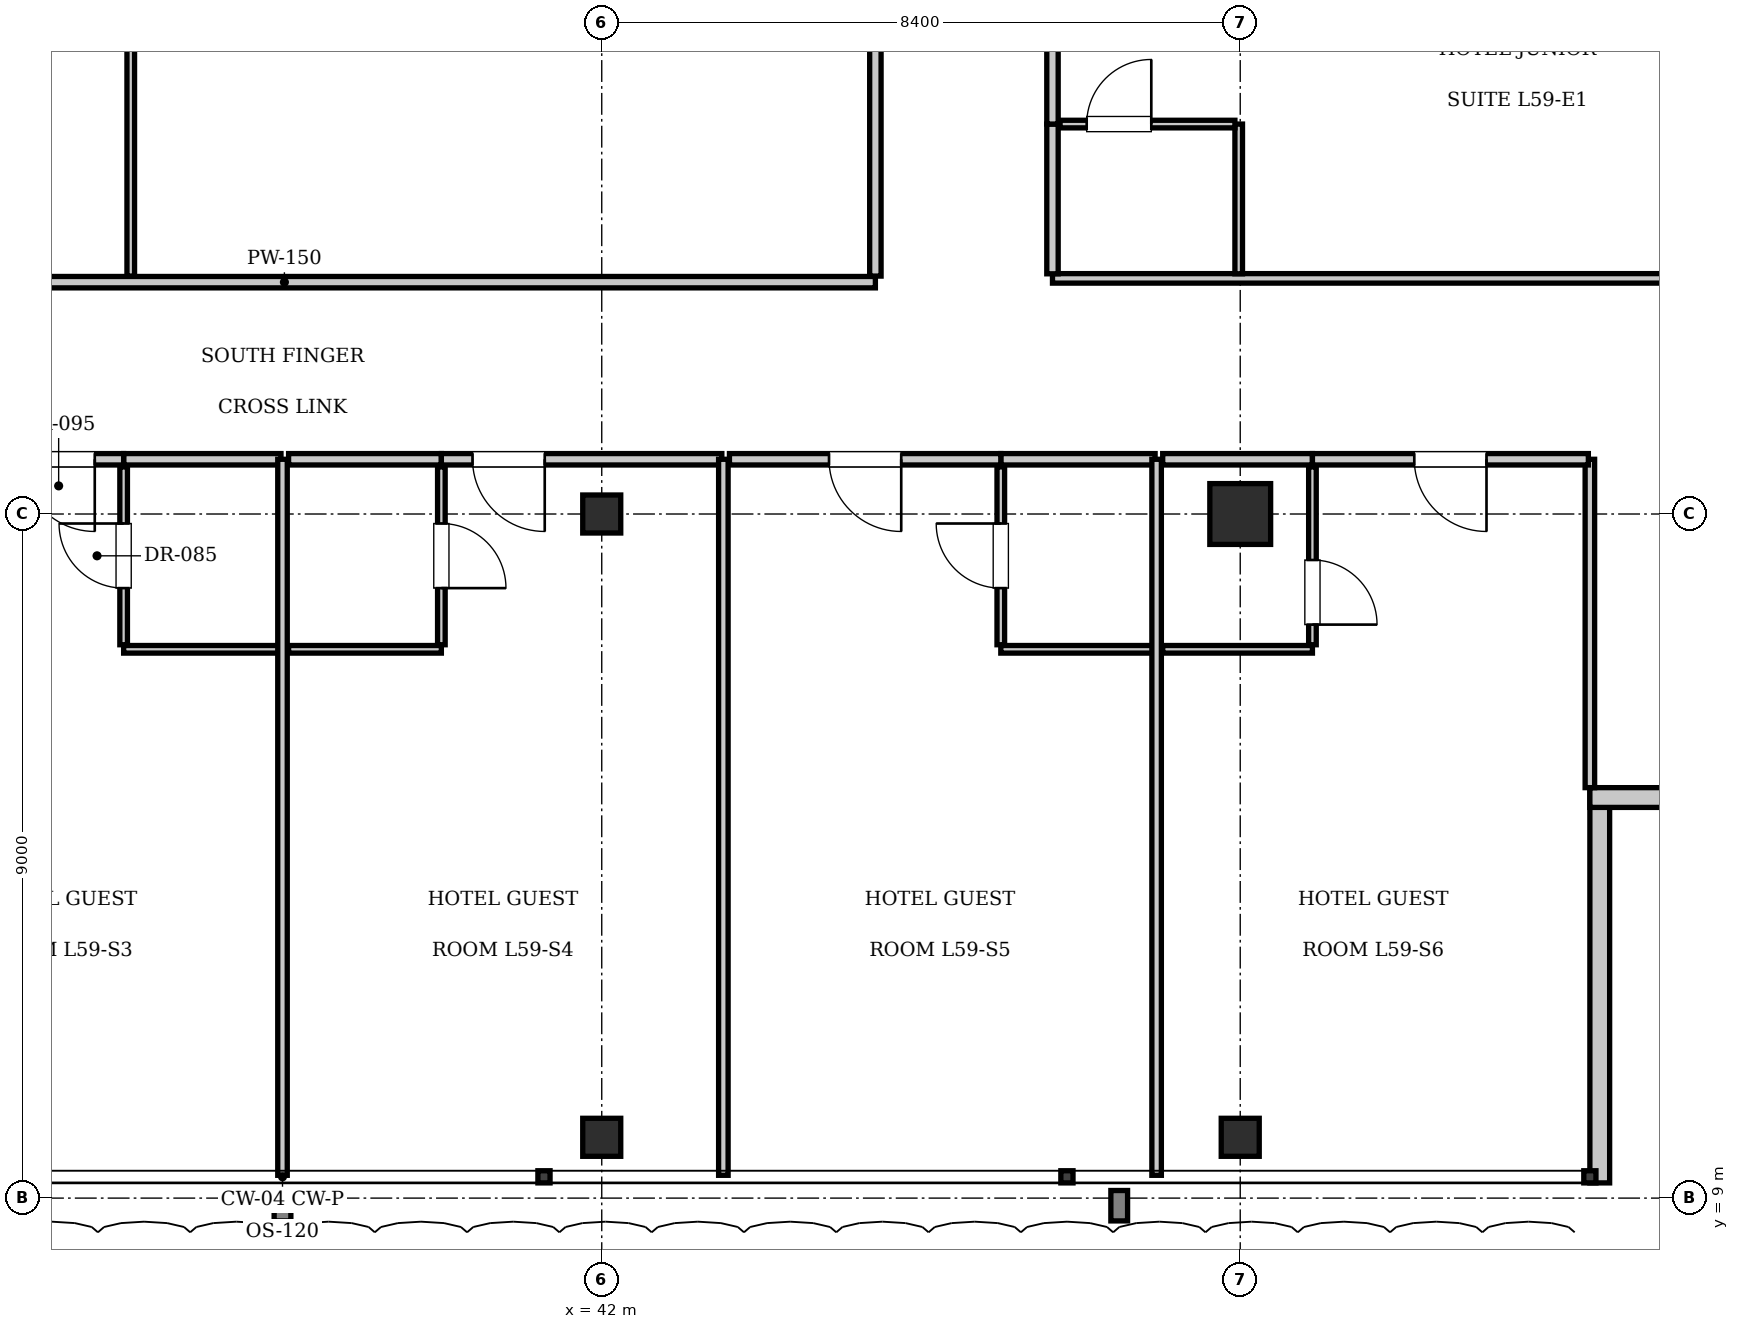
"""IFC4 building model, lengths in metres.
Left out: names, types, materials, properties, quantities, classifications, styles, units other than length and angle.
Written with IfcOpenShell. Run it as: python <this file> out.ifc"""

import sys

from ifc_helpers import new_model, si_unit, direction, frame, frame_2d, origin, origin_2d, place, context, subcontext, project, spatial, rectangle, i_section, extrude, element, fill, save


model = new_model("IFC4")
c1 = context("Model", 3, precision=1e-05, world=origin(), true_north=direction((0.0, 1.0)))
c2 = subcontext(c1, "Body", "Model", "MODEL_VIEW")
j1 = project(units=[si_unit("LENGTHUNIT", "METRE"), si_unit("PLANEANGLEUNIT", "RADIAN")], contexts=[c1])
p1 = place(None, origin())
s1 = spatial("IfcSite", under=j1, at=p1, CompositionType="ELEMENT")
p2 = place(p1, origin())
s2 = spatial("IfcBuilding", under=s1, at=p2, CompositionType="ELEMENT")
p3 = place(p2, frame((0.0, 0.0, 243.25)))
s3 = spatial("IfcBuildingStorey", under=s2, at=p3, CompositionType="ELEMENT", Elevation=243.25)
p4 = place(p3, frame((50.4, 18.0, 0.0), z_axis=(0.0, 0.0, 1.0), x_axis=(1.0, 0.0, 0.0)))
e1 = element("IfcColumn", 1, at=p4, inside=s3, PredefinedType="COLUMN", context=c2, shape_type="SweptSolid", body=[
    extrude(rectangle(XDim=0.8, YDim=0.8, at=origin_2d()), origin(), (0.0, 0.0, 1.0), 3.85),
])
for number, where, z_axis, x_axis in (
    (2, (42.0, 18.0, 0.0), (0.0, 0.0, 1.0), (1.0, 0.0, 0.0)),
    (3, (42.0, 9.8, 0.0), (0.0, 0.0, 1.0), (1.0, 0.0, 0.0)),
    (4, (50.4, 9.8, 0.0), (0.0, 0.0, 1.0), (1.0, 0.0, 0.0)),
):
    element("IfcColumn", number, at=place(p3, frame(where, z_axis=z_axis, x_axis=x_axis)), inside=s3, PredefinedType="COLUMN", context=c2, shape_type="SweptSolid", body=[
        extrude(i_section(OverallWidth=0.5, OverallDepth=0.5, WebThickness=0.022, FlangeThickness=0.032, at=origin_2d()), origin(), (0.0, 0.0, 1.0), 3.85),
    ])
p5 = place(p3, frame((55.13, 14.4, 0.0), z_axis=(0.0, 0.0, 1.0), x_axis=(0.0, -1.0, 0.0)))
e5 = element("IfcWall", 5, at=p5, inside=s3, PredefinedType="SOLIDWALL", context=c2, shape_type="SweptSolid", body=[
    extrude(rectangle(XDim=5.2, YDim=0.26, at=frame_2d((2.6, 0.0))), origin(), (0.0, 0.0, 1.0), 3.61),
])
p6 = place(p3, frame((60.2, 14.27, 0.0), z_axis=(0.0, 0.0, 1.0), x_axis=(-1.0, 0.0, 0.0)))
e6 = element("IfcWall", 6, at=p6, inside=s3, PredefinedType="SOLIDWALL", context=c2, shape_type="SweptSolid", body=[
    extrude(rectangle(XDim=5.2, YDim=0.26, at=frame_2d((2.6, 0.0))), origin(), (0.0, 0.0, 1.0), 3.61),
])
p7 = place(p6, frame((1.6, 0.0, 0.9)))
e7 = element("IfcOpeningElement", 7, at=p7, cuts=e6, PredefinedType="OPENING", context=c2, shape_type="SweptSolid", body=[
    extrude(rectangle(XDim=2.0, YDim=2.2, at=frame_2d((1.0, 1.1))), frame((0.0, 0.14, 0.0), z_axis=(0.0, -1.0, 0.0), x_axis=(1.0, 0.0, 0.0)), (0.0, 0.0, 1.0), 0.28),
])
p8 = place(p3, frame((30.05, 21.05, 0.0), z_axis=(0.0, 0.0, 1.0), x_axis=(1.0, 0.0, 0.0)))
e8 = element("IfcWall", 8, at=p8, inside=s3, PredefinedType="PARTITIONING", context=c2, shape_type="SweptSolid", body=[
    extrude(rectangle(XDim=15.55, YDim=0.15, at=frame_2d((7.775, 0.0))), origin(), (0.0, 0.0, 1.0), 3.61),
])
p9 = place(p3, frame((45.6, 21.13, 0.0), z_axis=(0.0, 0.0, 1.0), x_axis=(0.0, 1.0, 0.0)))
e9 = element("IfcWall", 9, at=p9, inside=s3, PredefinedType="PARTITIONING", context=c2, shape_type="SweptSolid", body=[
    extrude(rectangle(XDim=9.49, YDim=0.15, at=frame_2d((4.745, 0.0))), origin(), (0.0, 0.0, 1.0), 3.61),
])
p10 = place(p3, frame((35.803, 21.13, 0.0), z_axis=(0.0, 0.0, 1.0), x_axis=(0.0, 1.0, 0.0)))
e10 = element("IfcWall", 10, at=p10, inside=s3, PredefinedType="PARTITIONING", context=c2, shape_type="SweptSolid", body=[
    extrude(rectangle(XDim=9.49, YDim=0.1, at=frame_2d((4.745, 0.0))), origin(), (0.0, 0.0, 1.0), 3.61),
])
p11 = place(p3, frame((55.0, 14.4, 0.0), z_axis=(0.0, 0.0, 1.0), x_axis=(0.0, 1.0, 0.0)))
e11 = element("IfcWall", 11, at=p11, inside=s3, PredefinedType="PARTITIONING", context=c2, shape_type="SweptSolid", body=[
    extrude(rectangle(XDim=4.32, YDim=0.125, at=frame_2d((2.16, 0.0))), origin(), (0.0, 0.0, 1.0), 3.61),
])
p12 = place(p3, frame((35.71, 18.72, 0.0), z_axis=(0.0, 0.0, 1.0), x_axis=(1.0, 0.0, 0.0)))
e12 = element("IfcWall", 12, at=p12, inside=s3, PredefinedType="PARTITIONING", context=c2, shape_type="SweptSolid", body=[
    extrude(rectangle(XDim=2.07, YDim=0.15, at=frame_2d((1.035, 0.0))), origin(), (0.0, 0.0, 1.0), 3.61),
])
p13 = place(p3, frame((35.71, 16.22, 0.0), z_axis=(0.0, 0.0, 1.0), x_axis=(1.0, 0.0, 0.0)))
e13 = element("IfcWall", 13, at=p13, inside=s3, PredefinedType="PARTITIONING", context=c2, shape_type="SweptSolid", body=[
    extrude(rectangle(XDim=2.05, YDim=0.1, at=frame_2d((1.025, 0.0))), origin(), (0.0, 0.0, 1.0), 3.61),
])
p14 = place(p3, frame((35.71, 16.28, 0.0), z_axis=(0.0, 0.0, 1.0), x_axis=(0.0, 1.0, 0.0)))
e14 = element("IfcWall", 14, at=p14, inside=s3, PredefinedType="PARTITIONING", context=c2, shape_type="SweptSolid", body=[
    extrude(rectangle(XDim=2.34, YDim=0.1, at=frame_2d((1.17, 0.0))), origin(), (0.0, 0.0, 1.0), 3.61),
])
p15 = place(p14, frame((0.745, 0.0, 0.0)))
e15 = element("IfcOpeningElement", 15, at=p15, cuts=e14, PredefinedType="OPENING", context=c2, shape_type="SweptSolid", body=[
    extrude(rectangle(XDim=0.85, YDim=2.1, at=frame_2d((0.425, 1.05))), frame((0.0, 0.06, 0.0), z_axis=(0.0, -1.0, 0.0), x_axis=(1.0, 0.0, 0.0)), (0.0, 0.0, 1.0), 0.12),
])
p16 = place(p3, frame((32.08, 18.72, 0.0), z_axis=(0.0, 0.0, 1.0), x_axis=(1.0, 0.0, 0.0)))
e16 = element("IfcWall", 16, at=p16, inside=s3, PredefinedType="PARTITIONING", context=c2, shape_type="SweptSolid", body=[
    extrude(rectangle(XDim=3.63, YDim=0.15, at=frame_2d((1.815, 0.0))), origin(), (0.0, 0.0, 1.0), 3.61),
])
p17 = place(p16, frame((2.3, 0.0, 0.0)))
e17 = element("IfcOpeningElement", 17, at=p17, cuts=e16, PredefinedType="OPENING", context=c2, shape_type="SweptSolid", body=[
    extrude(rectangle(XDim=0.95, YDim=2.15, at=frame_2d((0.475, 1.075))), frame((0.0, 0.085, 0.0), z_axis=(0.0, -1.0, 0.0), x_axis=(1.0, 0.0, 0.0)), (0.0, 0.0, 1.0), 0.17),
])
p18 = place(p3, frame((37.8, 9.3, 0.0), z_axis=(0.0, 0.0, 1.0), x_axis=(0.0, 1.0, 0.0)))
e18 = element("IfcWall", 18, at=p18, inside=s3, PredefinedType="PARTITIONING", context=c2, shape_type="SweptSolid", body=[
    extrude(rectangle(XDim=9.42, YDim=0.125, at=frame_2d((4.71, 0.0))), origin(), (0.0, 0.0, 1.0), 3.3),
])
p19 = place(p3, frame((37.88, 18.72, 0.0), z_axis=(0.0, 0.0, 1.0), x_axis=(1.0, 0.0, 0.0)))
e19 = element("IfcWall", 19, at=p19, inside=s3, PredefinedType="PARTITIONING", context=c2, shape_type="SweptSolid", body=[
    extrude(rectangle(XDim=2.01, YDim=0.15, at=frame_2d((1.005, 0.0))), origin(), (0.0, 0.0, 1.0), 3.61),
])
p20 = place(p3, frame((37.88, 16.22, 0.0), z_axis=(0.0, 0.0, 1.0), x_axis=(1.0, 0.0, 0.0)))
e20 = element("IfcWall", 20, at=p20, inside=s3, PredefinedType="PARTITIONING", context=c2, shape_type="SweptSolid", body=[
    extrude(rectangle(XDim=2.01, YDim=0.1, at=frame_2d((1.005, 0.0))), origin(), (0.0, 0.0, 1.0), 3.61),
])
p21 = place(p3, frame((39.89, 16.28, 0.0), z_axis=(0.0, 0.0, 1.0), x_axis=(0.0, 1.0, 0.0)))
e21 = element("IfcWall", 21, at=p21, inside=s3, PredefinedType="PARTITIONING", context=c2, shape_type="SweptSolid", body=[
    extrude(rectangle(XDim=2.34, YDim=0.1, at=frame_2d((1.17, 0.0))), origin(), (0.0, 0.0, 1.0), 3.61),
])
p22 = place(p21, frame((0.745, 0.0, 0.0)))
e22 = element("IfcOpeningElement", 22, at=p22, cuts=e21, PredefinedType="OPENING", context=c2, shape_type="SweptSolid", body=[
    extrude(rectangle(XDim=0.85, YDim=2.1, at=frame_2d((0.425, 1.05))), frame((0.0, 0.06, 0.0), z_axis=(0.0, -1.0, 0.0), x_axis=(1.0, 0.0, 0.0)), (0.0, 0.0, 1.0), 0.12),
])
p23 = place(p3, frame((39.89, 18.72, 0.0), z_axis=(0.0, 0.0, 1.0), x_axis=(1.0, 0.0, 0.0)))
e23 = element("IfcWall", 23, at=p23, inside=s3, PredefinedType="PARTITIONING", context=c2, shape_type="SweptSolid", body=[
    extrude(rectangle(XDim=3.69, YDim=0.15, at=frame_2d((1.845, 0.0))), origin(), (0.0, 0.0, 1.0), 3.61),
])
p24 = place(p23, frame((0.41, 0.0, 0.0)))
e24 = element("IfcOpeningElement", 24, at=p24, cuts=e23, PredefinedType="OPENING", context=c2, shape_type="SweptSolid", body=[
    extrude(rectangle(XDim=0.95, YDim=2.15, at=frame_2d((0.475, 1.075))), frame((0.0, 0.085, 0.0), z_axis=(0.0, -1.0, 0.0), x_axis=(1.0, 0.0, 0.0)), (0.0, 0.0, 1.0), 0.17),
])
p25 = place(p3, frame((43.6, 9.3, 0.0), z_axis=(0.0, 0.0, 1.0), x_axis=(0.0, 1.0, 0.0)))
e25 = element("IfcWall", 25, at=p25, inside=s3, PredefinedType="PARTITIONING", context=c2, shape_type="SweptSolid", body=[
    extrude(rectangle(XDim=9.42, YDim=0.125, at=frame_2d((4.71, 0.0))), origin(), (0.0, 0.0, 1.0), 3.61),
])
p26 = place(p3, frame((47.25, 18.72, 0.0), z_axis=(0.0, 0.0, 1.0), x_axis=(1.0, 0.0, 0.0)))
e26 = element("IfcWall", 26, at=p26, inside=s3, PredefinedType="PARTITIONING", context=c2, shape_type="SweptSolid", body=[
    extrude(rectangle(XDim=2.03, YDim=0.15, at=frame_2d((1.015, 0.0))), origin(), (0.0, 0.0, 1.0), 3.61),
])
p27 = place(p3, frame((47.25, 16.22, 0.0), z_axis=(0.0, 0.0, 1.0), x_axis=(1.0, 0.0, 0.0)))
e27 = element("IfcWall", 27, at=p27, inside=s3, PredefinedType="PARTITIONING", context=c2, shape_type="SweptSolid", body=[
    extrude(rectangle(XDim=2.01, YDim=0.1, at=frame_2d((1.005, 0.0))), origin(), (0.0, 0.0, 1.0), 3.61),
])
p28 = place(p3, frame((47.25, 16.28, 0.0), z_axis=(0.0, 0.0, 1.0), x_axis=(0.0, 1.0, 0.0)))
e28 = element("IfcWall", 28, at=p28, inside=s3, PredefinedType="PARTITIONING", context=c2, shape_type="SweptSolid", body=[
    extrude(rectangle(XDim=2.34, YDim=0.1, at=frame_2d((1.17, 0.0))), origin(), (0.0, 0.0, 1.0), 3.61),
])
p29 = place(p28, frame((0.745, 0.0, 0.0)))
e29 = element("IfcOpeningElement", 29, at=p29, cuts=e28, PredefinedType="OPENING", context=c2, shape_type="SweptSolid", body=[
    extrude(rectangle(XDim=0.85, YDim=2.1, at=frame_2d((0.425, 1.05))), frame((0.0, 0.06, 0.0), z_axis=(0.0, -1.0, 0.0), x_axis=(1.0, 0.0, 0.0)), (0.0, 0.0, 1.0), 0.12),
])
p30 = place(p3, frame((43.68, 18.72, 0.0), z_axis=(0.0, 0.0, 1.0), x_axis=(1.0, 0.0, 0.0)))
e30 = element("IfcWall", 30, at=p30, inside=s3, PredefinedType="PARTITIONING", context=c2, shape_type="SweptSolid", body=[
    extrude(rectangle(XDim=3.57, YDim=0.15, at=frame_2d((1.785, 0.0))), origin(), (0.0, 0.0, 1.0), 3.61),
])
p31 = place(p30, frame((1.31, 0.0, 0.0)))
e31 = element("IfcOpeningElement", 31, at=p31, cuts=e30, PredefinedType="OPENING", context=c2, shape_type="SweptSolid", body=[
    extrude(rectangle(XDim=0.95, YDim=2.15, at=frame_2d((0.475, 1.075))), frame((0.0, 0.085, 0.0), z_axis=(0.0, -1.0, 0.0), x_axis=(1.0, 0.0, 0.0)), (0.0, 0.0, 1.0), 0.17),
])
p32 = place(p3, frame((49.3, 9.3, 0.0), z_axis=(0.0, 0.0, 1.0), x_axis=(0.0, 1.0, 0.0)))
e32 = element("IfcWall", 32, at=p32, inside=s3, PredefinedType="PARTITIONING", context=c2, shape_type="SweptSolid", body=[
    extrude(rectangle(XDim=9.42, YDim=0.125, at=frame_2d((4.71, 0.0))), origin(), (0.0, 0.0, 1.0), 3.61),
])
p33 = place(p3, frame((49.38, 18.72, 0.0), z_axis=(0.0, 0.0, 1.0), x_axis=(1.0, 0.0, 0.0)))
e33 = element("IfcWall", 33, at=p33, inside=s3, PredefinedType="PARTITIONING", context=c2, shape_type="SweptSolid", body=[
    extrude(rectangle(XDim=1.97, YDim=0.15, at=frame_2d((0.985, 0.0))), origin(), (0.0, 0.0, 1.0), 3.61),
])
p34 = place(p3, frame((49.38, 16.22, 0.0), z_axis=(0.0, 0.0, 1.0), x_axis=(1.0, 0.0, 0.0)))
e34 = element("IfcWall", 34, at=p34, inside=s3, PredefinedType="PARTITIONING", context=c2, shape_type="SweptSolid", body=[
    extrude(rectangle(XDim=1.97, YDim=0.1, at=frame_2d((0.985, 0.0))), origin(), (0.0, 0.0, 1.0), 3.61),
])
p35 = place(p3, frame((51.35, 16.28, 0.0), z_axis=(0.0, 0.0, 1.0), x_axis=(0.0, 1.0, 0.0)))
e35 = element("IfcWall", 35, at=p35, inside=s3, PredefinedType="PARTITIONING", context=c2, shape_type="SweptSolid", body=[
    extrude(rectangle(XDim=2.34, YDim=0.1, at=frame_2d((1.17, 0.0))), origin(), (0.0, 0.0, 1.0), 3.61),
])
p36 = place(p35, frame((0.265, 0.0, 0.0)))
e36 = element("IfcOpeningElement", 36, at=p36, cuts=e35, PredefinedType="OPENING", context=c2, shape_type="SweptSolid", body=[
    extrude(rectangle(XDim=0.85, YDim=2.1, at=frame_2d((0.425, 1.05))), frame((0.0, 0.06, 0.0), z_axis=(0.0, -1.0, 0.0), x_axis=(1.0, 0.0, 0.0)), (0.0, 0.0, 1.0), 0.12),
])
p37 = place(p3, frame((51.35, 18.72, 0.0), z_axis=(0.0, 0.0, 1.0), x_axis=(1.0, 0.0, 0.0)))
e37 = element("IfcWall", 37, at=p37, inside=s3, PredefinedType="PARTITIONING", context=c2, shape_type="SweptSolid", body=[
    extrude(rectangle(XDim=3.63, YDim=0.15, at=frame_2d((1.815, 0.0))), origin(), (0.0, 0.0, 1.0), 3.61),
])
p38 = place(p37, frame((1.34, 0.0, 0.0)))
e38 = element("IfcOpeningElement", 38, at=p38, cuts=e37, PredefinedType="OPENING", context=c2, shape_type="SweptSolid", body=[
    extrude(rectangle(XDim=0.95, YDim=2.15, at=frame_2d((0.475, 1.075))), frame((0.0, 0.085, 0.0), z_axis=(0.0, -1.0, 0.0), x_axis=(1.0, 0.0, 0.0)), (0.0, 0.0, 1.0), 0.17),
])
p39 = place(p3, frame((47.93, 21.1, 0.0), z_axis=(0.0, 0.0, 1.0), x_axis=(1.0, 0.0, 0.0)))
e39 = element("IfcWall", 39, at=p39, inside=s3, PredefinedType="PARTITIONING", context=c2, shape_type="SweptSolid", body=[
    extrude(rectangle(XDim=12.17, YDim=0.125, at=frame_2d((6.085, 0.0))), origin(), (0.0, 0.0, 1.0), 3.61),
])
p40 = place(p3, frame((47.93, 21.16, 0.0), z_axis=(0.0, 0.0, 1.0), x_axis=(0.0, 1.0, 0.0)))
e40 = element("IfcWall", 40, at=p40, inside=s3, PredefinedType="PARTITIONING", context=c2, shape_type="SweptSolid", body=[
    extrude(rectangle(XDim=1.97, YDim=0.15, at=frame_2d((0.985, 0.0))), origin(), (0.0, 0.0, 1.0), 3.61),
])
p41 = place(p3, frame((47.93, 23.13, 0.0), z_axis=(0.0, 0.0, 1.0), x_axis=(0.0, 1.0, 0.0)))
e41 = element("IfcWall", 41, at=p41, inside=s3, PredefinedType="PARTITIONING", context=c2, shape_type="SweptSolid", body=[
    extrude(rectangle(XDim=3.55, YDim=0.15, at=frame_2d((1.775, 0.0))), origin(), (0.0, 0.0, 1.0), 3.61),
])
p42 = place(p41, frame((1.3, 0.0, 0.0)))
e42 = element("IfcOpeningElement", 42, at=p42, cuts=e41, PredefinedType="OPENING", context=c2, shape_type="SweptSolid", body=[
    extrude(rectangle(XDim=0.95, YDim=2.15, at=frame_2d((0.475, 1.075))), frame((0.0, 0.085, 0.0), z_axis=(0.0, -1.0, 0.0), x_axis=(1.0, 0.0, 0.0)), (0.0, 0.0, 1.0), 0.17),
])
p43 = place(p3, frame((50.38, 21.16, 0.0), z_axis=(0.0, 0.0, 1.0), x_axis=(0.0, 1.0, 0.0)))
e43 = element("IfcWall", 43, at=p43, inside=s3, PredefinedType="PARTITIONING", context=c2, shape_type="SweptSolid", body=[
    extrude(rectangle(XDim=1.97, YDim=0.1, at=frame_2d((0.985, 0.0))), origin(), (0.0, 0.0, 1.0), 3.077),
])
p44 = place(p3, frame((48.03, 23.13, 0.0), z_axis=(0.0, 0.0, 1.0), x_axis=(1.0, 0.0, 0.0)))
e44 = element("IfcWall", 44, at=p44, inside=s3, PredefinedType="PARTITIONING", context=c2, shape_type="SweptSolid", body=[
    extrude(rectangle(XDim=2.3, YDim=0.1, at=frame_2d((1.15, 0.0))), origin(), (0.0, 0.0, 1.0), 3.61),
])
p45 = place(p44, frame((0.35, 0.0, 0.0)))
e45 = element("IfcOpeningElement", 45, at=p45, cuts=e44, PredefinedType="OPENING", context=c2, shape_type="SweptSolid", body=[
    extrude(rectangle(XDim=0.85, YDim=2.1, at=frame_2d((0.425, 1.05))), frame((0.0, 0.06, 0.0), z_axis=(0.0, -1.0, 0.0), x_axis=(1.0, 0.0, 0.0)), (0.0, 0.0, 1.0), 0.12),
])
p46 = place(p15, origin())
e46 = element("IfcDoor", 46, at=p46, inside=s3, OperationType="SINGLE_SWING_RIGHT", PredefinedType="DOOR", context=c2, shape_type="SweptSolid", body=[
    extrude(rectangle(XDim=0.85, YDim=2.1, at=frame_2d((0.425, 1.05))), frame((0.0, 0.025, 0.0), z_axis=(0.0, -1.0, 0.0), x_axis=(1.0, 0.0, 0.0)), (0.0, 0.0, 1.0), 0.05),
])
fill(e15, e46)
p47 = place(p17, frame((0.95, 0.0, 0.0), z_axis=(0.0, 0.0, 1.0), x_axis=(-1.0, 0.0, 0.0)))
e47 = element("IfcDoor", 47, at=p47, inside=s3, OperationType="SINGLE_SWING_LEFT", PredefinedType="DOOR", context=c2, shape_type="SweptSolid", body=[
    extrude(rectangle(XDim=0.95, YDim=2.15, at=frame_2d((0.475, 1.075))), frame((0.0, 0.025, 0.0), z_axis=(0.0, -1.0, 0.0), x_axis=(1.0, 0.0, 0.0)), (0.0, 0.0, 1.0), 0.05),
])
fill(e17, e47)
p48 = place(p22, frame((0.85, 0.0, 0.0), z_axis=(0.0, 0.0, 1.0), x_axis=(-1.0, 0.0, 0.0)))
e48 = element("IfcDoor", 48, at=p48, inside=s3, OperationType="SINGLE_SWING_RIGHT", PredefinedType="DOOR", context=c2, shape_type="SweptSolid", body=[
    extrude(rectangle(XDim=0.85, YDim=2.1, at=frame_2d((0.425, 1.05))), frame((0.0, 0.025, 0.0), z_axis=(0.0, -1.0, 0.0), x_axis=(1.0, 0.0, 0.0)), (0.0, 0.0, 1.0), 0.05),
])
fill(e22, e48)
p49 = place(p24, frame((0.95, 0.0, 0.0), z_axis=(0.0, 0.0, 1.0), x_axis=(-1.0, 0.0, 0.0)))
e49 = element("IfcDoor", 49, at=p49, inside=s3, OperationType="SINGLE_SWING_LEFT", PredefinedType="DOOR", context=c2, shape_type="SweptSolid", body=[
    extrude(rectangle(XDim=0.95, YDim=2.15, at=frame_2d((0.475, 1.075))), frame((0.0, 0.025, 0.0), z_axis=(0.0, -1.0, 0.0), x_axis=(1.0, 0.0, 0.0)), (0.0, 0.0, 1.0), 0.05),
])
fill(e24, e49)
p50 = place(p29, origin())
e50 = element("IfcDoor", 50, at=p50, inside=s3, OperationType="SINGLE_SWING_RIGHT", PredefinedType="DOOR", context=c2, shape_type="SweptSolid", body=[
    extrude(rectangle(XDim=0.85, YDim=2.1, at=frame_2d((0.425, 1.05))), frame((0.0, 0.025, 0.0), z_axis=(0.0, -1.0, 0.0), x_axis=(1.0, 0.0, 0.0)), (0.0, 0.0, 1.0), 0.05),
])
fill(e29, e50)
p51 = place(p31, frame((0.95, 0.0, 0.0), z_axis=(0.0, 0.0, 1.0), x_axis=(-1.0, 0.0, 0.0)))
e51 = element("IfcDoor", 51, at=p51, inside=s3, OperationType="SINGLE_SWING_LEFT", PredefinedType="DOOR", context=c2, shape_type="SweptSolid", body=[
    extrude(rectangle(XDim=0.95, YDim=2.15, at=frame_2d((0.475, 1.075))), frame((0.0, 0.025, 0.0), z_axis=(0.0, -1.0, 0.0), x_axis=(1.0, 0.0, 0.0)), (0.0, 0.0, 1.0), 0.05),
])
fill(e31, e51)
p52 = place(p36, frame((0.85, 0.0, 0.0), z_axis=(0.0, 0.0, 1.0), x_axis=(-1.0, 0.0, 0.0)))
e52 = element("IfcDoor", 52, at=p52, inside=s3, OperationType="SINGLE_SWING_RIGHT", PredefinedType="DOOR", context=c2, shape_type="SweptSolid", body=[
    extrude(rectangle(XDim=0.85, YDim=2.1, at=frame_2d((0.425, 1.05))), frame((0.0, 0.025, 0.0), z_axis=(0.0, -1.0, 0.0), x_axis=(1.0, 0.0, 0.0)), (0.0, 0.0, 1.0), 0.05),
])
fill(e36, e52)
p53 = place(p38, frame((0.95, 0.0, 0.0), z_axis=(0.0, 0.0, 1.0), x_axis=(-1.0, 0.0, 0.0)))
e53 = element("IfcDoor", 53, at=p53, inside=s3, OperationType="SINGLE_SWING_LEFT", PredefinedType="DOOR", context=c2, shape_type="SweptSolid", body=[
    extrude(rectangle(XDim=0.95, YDim=2.15, at=frame_2d((0.475, 1.075))), frame((0.0, 0.025, 0.0), z_axis=(0.0, -1.0, 0.0), x_axis=(1.0, 0.0, 0.0)), (0.0, 0.0, 1.0), 0.05),
])
fill(e38, e53)
p54 = place(p45, origin())
e54 = element("IfcDoor", 54, at=p54, inside=s3, OperationType="SINGLE_SWING_RIGHT", PredefinedType="DOOR", context=c2, shape_type="SweptSolid", body=[
    extrude(rectangle(XDim=0.85, YDim=2.1, at=frame_2d((0.425, 1.05))), frame((0.0, 0.025, 0.0), z_axis=(0.0, -1.0, 0.0), x_axis=(1.0, 0.0, 0.0)), (0.0, 0.0, 1.0), 0.05),
])
fill(e45, e54)
save(model, sys.argv[1])
